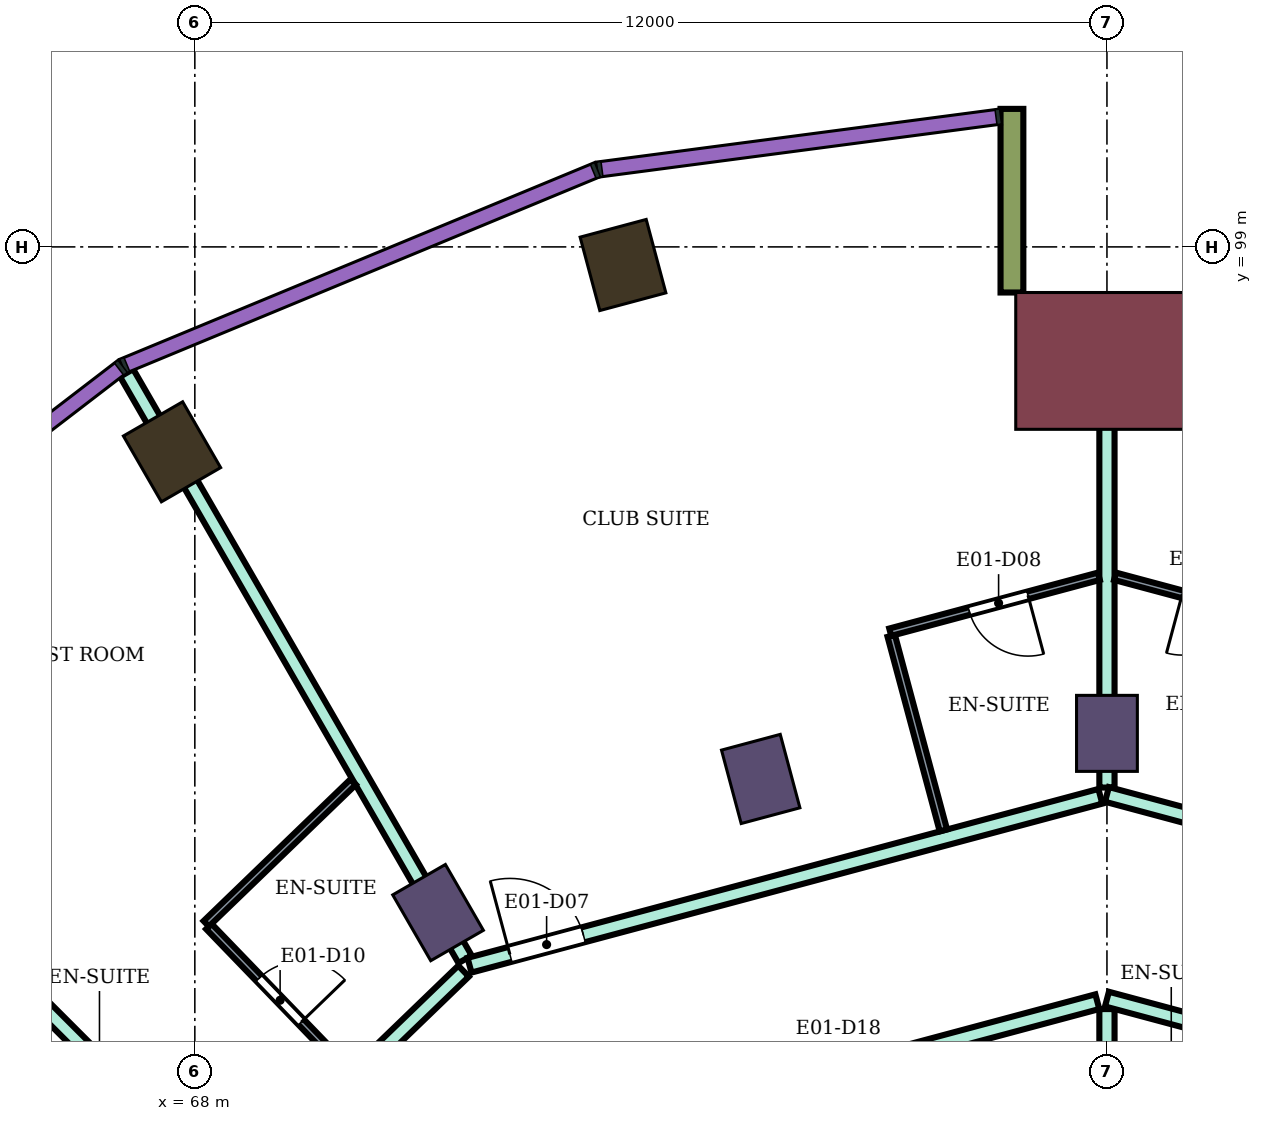
"""IFC4 building model, lengths in metres.
Left out: names, types, materials, properties, quantities, classifications, styles, units other than length and angle.
Written with IfcOpenShell. Run it as: python <this file> out.ifc"""

import sys

from ifc_helpers import new_model, si_unit, direction, frame, frame_2d, origin, origin_2d, place, context, subcontext, project, spatial, rectangle, extrude, element, fill, save


model = new_model("IFC4")
c1 = context("Model", 3, precision=1e-05, world=origin(), true_north=direction((0.0, 1.0)))
c2 = subcontext(c1, "Body", "Model", "MODEL_VIEW")
j1 = project(units=[si_unit("LENGTHUNIT", "METRE"), si_unit("PLANEANGLEUNIT", "RADIAN")], contexts=[c1])
p1 = place(None, origin())
s1 = spatial("IfcSite", under=j1, at=p1, CompositionType="ELEMENT")
p2 = place(p1, origin())
s2 = spatial("IfcBuilding", under=s1, at=p2, CompositionType="ELEMENT")
p3 = place(p2, frame((0.0, 0.0, 118.5)))
s3 = spatial("IfcBuildingStorey", under=s2, at=p3, CompositionType="ELEMENT", Elevation=118.5)
for number, where, z_axis, x_axis in (
    (1, (73.633, 98.762, 0.0), (0.0, 0.0, 1.0), (-0.259, 0.966, 0.0)),
    (2, (67.7, 96.304, 0.0), (0.0, 0.0, 1.0), (-0.5, 0.866, 0.0)),
):
    element("IfcColumn", number, at=place(p3, frame(where, z_axis=z_axis, x_axis=x_axis)), inside=s3, PredefinedType="COLUMN", context=c2, shape_type="SweptSolid", body=[
        extrude(rectangle(XDim=1.0, YDim=0.9, at=origin_2d()), origin(), (0.0, 0.0, 1.0), 3.9),
    ])
for number, where, z_axis, x_axis in (
    (3, (80.0, 92.6, 0.0), (0.0, 0.0, 1.0), (0.0, 1.0, 0.0)),
    (4, (75.445, 92.0, 0.0), (0.0, 0.0, 1.0), (-0.259, 0.966, 0.0)),
    (5, (71.2, 90.242, 0.0), (0.0, 0.0, 1.0), (-0.5, 0.866, 0.0)),
):
    element("IfcColumn", number, at=place(p3, frame(where, z_axis=z_axis, x_axis=x_axis)), inside=s3, PredefinedType="COLUMN", context=c2, shape_type="SweptSolid", body=[
        extrude(rectangle(XDim=1.0, YDim=0.8, at=origin_2d()), origin(), (0.0, 0.0, 1.0), 3.9),
    ])
p4 = place(p3, frame((80.0, 97.5, 0.0), z_axis=(0.0, 0.0, 1.0), x_axis=(0.0, 1.0, 0.0)))
e6 = element("IfcColumn", 6, at=p4, inside=s3, PredefinedType="COLUMN", context=c2, shape_type="SweptSolid", body=[
    extrude(rectangle(XDim=1.8, YDim=2.4, at=origin_2d()), origin(), (0.0, 0.0, 1.0), 3.9),
])
p5 = place(p3, frame((78.75, 98.4, 0.0), z_axis=(0.0, 0.0, 1.0), x_axis=(0.0, 1.0, 0.0)))
e7 = element("IfcWall", 7, at=p5, inside=s3, PredefinedType="NOTDEFINED", context=c2, shape_type="SweptSolid", body=[
    extrude(rectangle(XDim=2.416, YDim=0.3, at=frame_2d((1.208, 0.0))), origin(), (0.0, 0.0, 1.0), 3.9),
])
p6 = place(p3, frame((63.598, 91.408, 0.0), z_axis=(0.0, 0.0, 1.0), x_axis=(0.706963264491, -0.707250268759, 0.0)))
e8 = element("IfcWall", 8, at=p6, inside=s3, PredefinedType="PARTITIONING", context=c2, shape_type="SweptSolid", body=[
    extrude(rectangle(XDim=6.805, YDim=0.2, at=frame_2d((3.403, 0.0))), origin(), (0.0, 0.0, 1.0), 3.45),
])
p7 = place(p3, frame((66.797, 84.9, 0.0), z_axis=(0.0, 0.0, 1.0), x_axis=(0.719692092412, 0.694293376116, 0.0)))
e9 = element("IfcWall", 9, at=p7, inside=s3, PredefinedType="PARTITIONING", context=c2, shape_type="SweptSolid", body=[
    extrude(rectangle(XDim=6.584, YDim=0.2, at=frame_2d((3.292, 0.0))), origin(), (0.0, 0.0, 1.0), 3.45),
])
p8 = place(p7, frame((2.866, 0.0, 0.0)))
e10 = element("IfcOpeningElement", 10, at=p8, cuts=e9, PredefinedType="OPENING", context=c2, shape_type="SweptSolid", body=[
    extrude(rectangle(XDim=1.0, YDim=2.1, at=frame_2d((0.5, 1.05))), frame((0.0, 0.11, 0.0), z_axis=(0.0, -1.0, 0.0), x_axis=(1.0, 0.0, 0.0)), (0.0, 0.0, 1.0), 0.22),
])
p9 = place(p3, frame((67.102, 97.342, 0.0), z_axis=(0.0, 0.0, 1.0), x_axis=(0.499927298089, -0.866067374183, 0.0)))
e11 = element("IfcWall", 11, at=p9, inside=s3, PredefinedType="PARTITIONING", context=c2, shape_type="SweptSolid", body=[
    extrude(rectangle(XDim=8.907, YDim=0.2, at=frame_2d((4.454, 0.0))), origin(), (0.0, 0.0, 1.0), 3.45),
])
p10 = place(p3, frame((71.614, 89.55, 0.0), z_axis=(0.0, 0.0, 1.0), x_axis=(0.965967958589, 0.258661753994, 0.0)))
e12 = element("IfcWall", 12, at=p10, inside=s3, PredefinedType="PARTITIONING", context=c2, shape_type="SweptSolid", body=[
    extrude(rectangle(XDim=8.592, YDim=0.2, at=frame_2d((4.296, 0.0))), origin(), (0.0, 0.0, 1.0), 3.45),
])
p11 = place(p10, frame((0.55, 0.0, 0.0)))
e13 = element("IfcOpeningElement", 13, at=p11, cuts=e12, PredefinedType="OPENING", context=c2, shape_type="SweptSolid", body=[
    extrude(rectangle(XDim=1.0, YDim=2.1, at=frame_2d((0.5, 1.05))), frame((0.0, 0.11, 0.0), z_axis=(0.0, -1.0, 0.0), x_axis=(1.0, 0.0, 0.0)), (0.0, 0.0, 1.0), 0.22),
])
p12 = place(p3, frame((72.936, 87.211, 0.0), z_axis=(0.0, 0.0, 1.0), x_axis=(0.965917703859, 0.258849356521, 0.0)))
e14 = element("IfcWall", 14, at=p12, inside=s3, PredefinedType="PARTITIONING", context=c2, shape_type="SweptSolid", body=[
    extrude(rectangle(XDim=7.182, YDim=0.2, at=frame_2d((3.591, 0.0))), origin(), (0.0, 0.0, 1.0), 3.45),
])
p13 = place(p12, frame((2.757, 0.0, 0.0)))
e15 = element("IfcOpeningElement", 15, at=p13, cuts=e14, PredefinedType="OPENING", context=c2, shape_type="SweptSolid", body=[
    extrude(rectangle(XDim=1.8, YDim=2.1, at=frame_2d((0.9, 1.05))), frame((0.0, 0.11, 0.0), z_axis=(0.0, -1.0, 0.0), x_axis=(1.0, 0.0, 0.0)), (0.0, 0.0, 1.0), 0.22),
])
p14 = place(p3, frame((80.0, 82.7, 0.0), z_axis=(0.0, 0.0, 1.0), x_axis=(0.0, 1.0, 0.0)))
e16 = element("IfcWall", 16, at=p14, inside=s3, PredefinedType="PARTITIONING", context=c2, shape_type="SweptSolid", body=[
    extrude(rectangle(XDim=6.273, YDim=0.2, at=frame_2d((3.136, 0.0))), origin(), (0.0, 0.0, 1.0), 3.45),
])
p15 = place(p3, frame((80.0, 89.104, 0.0), z_axis=(0.0, 0.0, 1.0), x_axis=(0.965856548257, -0.259077455964, 0.0)))
e17 = element("IfcWall", 17, at=p15, inside=s3, PredefinedType="PARTITIONING", context=c2, shape_type="SweptSolid", body=[
    extrude(rectangle(XDim=7.173, YDim=0.2, at=frame_2d((3.586, 0.0))), origin(), (0.0, 0.0, 1.0), 3.45),
])
p16 = place(p15, frame((5.763, 0.0, 0.0)))
e18 = element("IfcOpeningElement", 18, at=p16, cuts=e17, PredefinedType="OPENING", context=c2, shape_type="SweptSolid", body=[
    extrude(rectangle(XDim=1.0, YDim=2.1, at=frame_2d((0.5, 1.05))), frame((0.0, 0.11, 0.0), z_axis=(0.0, -1.0, 0.0), x_axis=(1.0, 0.0, 0.0)), (0.0, 0.0, 1.0), 0.22),
])
p17 = place(p3, frame((80.0, 91.887, 0.0), z_axis=(0.0, 0.0, 1.0), x_axis=(0.0, 1.0, 0.0)))
e19 = element("IfcWall", 19, at=p17, inside=s3, PredefinedType="PARTITIONING", context=c2, shape_type="SweptSolid", body=[
    extrude(rectangle(XDim=6.312, YDim=0.2, at=frame_2d((3.156, 0.0))), origin(), (0.0, 0.0, 1.0), 3.45),
])
p18 = place(p3, frame((80.0, 91.797, 0.0), z_axis=(0.0, 0.0, 1.0), x_axis=(0.965857042792, -0.259075612301, 0.0)))
e20 = element("IfcWall", 20, at=p18, inside=s3, PredefinedType="PARTITIONING", context=c2, shape_type="SweptSolid", body=[
    extrude(rectangle(XDim=8.602, YDim=0.2, at=frame_2d((4.301, 0.0))), origin(), (0.0, 0.0, 1.0), 3.45),
])
p19 = place(p18, frame((4.877, 0.0, 0.0)))
e21 = element("IfcOpeningElement", 21, at=p19, cuts=e20, PredefinedType="OPENING", context=c2, shape_type="SweptSolid", body=[
    extrude(rectangle(XDim=1.0, YDim=2.1, at=frame_2d((0.5, 1.05))), frame((0.0, 0.11, 0.0), z_axis=(0.0, -1.0, 0.0), x_axis=(1.0, 0.0, 0.0)), (0.0, 0.0, 1.0), 0.22),
])
p20 = place(p18, frame((2.817, 0.0, 0.0)))
e22 = element("IfcOpeningElement", 22, at=p20, cuts=e20, PredefinedType="OPENING", context=c2, shape_type="SweptSolid", body=[
    extrude(rectangle(XDim=1.0, YDim=2.1, at=frame_2d((0.5, 1.05))), frame((0.0, 0.11, 0.0), z_axis=(0.0, -1.0, 0.0), x_axis=(1.0, 0.0, 0.0)), (0.0, 0.0, 1.0), 0.22),
])
p21 = place(p3, frame((68.185, 90.06, 0.0), z_axis=(0.0, 0.0, 1.0), x_axis=(0.69446127412, -0.719530081892, 0.0)))
e23 = element("IfcWall", 23, at=p21, inside=s3, PredefinedType="PARTITIONING", context=c2, shape_type="SweptSolid", body=[
    extrude(rectangle(XDim=2.649, YDim=0.1, at=frame_2d((1.324, 0.0))), origin(), (0.0, 0.0, 1.0), 3.45),
])
p22 = place(p21, frame((0.95, 0.0, 0.0)))
e24 = element("IfcOpeningElement", 24, at=p22, cuts=e23, PredefinedType="OPENING", context=c2, shape_type="SweptSolid", body=[
    extrude(rectangle(XDim=0.8, YDim=2.1, at=frame_2d((0.4, 1.05))), frame((0.0, 0.06, 0.0), z_axis=(0.0, -1.0, 0.0), x_axis=(1.0, 0.0, 0.0)), (0.0, 0.0, 1.0), 0.12),
])
p23 = place(p3, frame((68.15, 90.096, 0.0), z_axis=(0.0, 0.0, 1.0), x_axis=(0.719667544954, 0.694318820672, 0.0)))
e25 = element("IfcWall", 25, at=p23, inside=s3, PredefinedType="PARTITIONING", context=c2, shape_type="SweptSolid", body=[
    extrude(rectangle(XDim=2.687, YDim=0.1, at=frame_2d((1.344, 0.0))), origin(), (0.0, 0.0, 1.0), 3.45),
])
p24 = place(p3, frame((77.162, 93.883, 0.0), z_axis=(0.0, 0.0, 1.0), x_axis=(0.258998589493, -0.965877699629, 0.0)))
e26 = element("IfcWall", 26, at=p24, inside=s3, PredefinedType="PARTITIONING", context=c2, shape_type="SweptSolid", body=[
    extrude(rectangle(XDim=2.65, YDim=0.1, at=frame_2d((1.325, 0.0))), origin(), (0.0, 0.0, 1.0), 3.45),
])
p25 = place(p3, frame((77.149, 93.931, 0.0), z_axis=(0.0, 0.0, 1.0), x_axis=(0.965916219953, 0.258854893776, 0.0)))
e27 = element("IfcWall", 27, at=p25, inside=s3, PredefinedType="PARTITIONING", context=c2, shape_type="SweptSolid", body=[
    extrude(rectangle(XDim=2.842, YDim=0.1, at=frame_2d((1.421, 0.0))), origin(), (0.0, 0.0, 1.0), 3.45),
])
p26 = place(p25, frame((1.076, 0.0, 0.0)))
e28 = element("IfcOpeningElement", 28, at=p26, cuts=e27, PredefinedType="OPENING", context=c2, shape_type="SweptSolid", body=[
    extrude(rectangle(XDim=0.8, YDim=2.1, at=frame_2d((0.4, 1.05))), frame((0.0, 0.06, 0.0), z_axis=(0.0, -1.0, 0.0), x_axis=(1.0, 0.0, 0.0)), (0.0, 0.0, 1.0), 0.12),
])
p27 = place(p3, frame((80.106, 94.667, 0.0), z_axis=(0.0, 0.0, 1.0), x_axis=(0.965904298007, -0.258899376382, 0.0)))
e29 = element("IfcWall", 29, at=p27, inside=s3, PredefinedType="PARTITIONING", context=c2, shape_type="SweptSolid", body=[
    extrude(rectangle(XDim=2.69, YDim=0.1, at=frame_2d((1.345, 0.0))), origin(), (0.0, 0.0, 1.0), 3.45),
])
p28 = place(p27, frame((0.915, 0.0, 0.0)))
e30 = element("IfcOpeningElement", 30, at=p28, cuts=e29, PredefinedType="OPENING", context=c2, shape_type="SweptSolid", body=[
    extrude(rectangle(XDim=0.8, YDim=2.1, at=frame_2d((0.4, 1.05))), frame((0.0, 0.06, 0.0), z_axis=(0.0, -1.0, 0.0), x_axis=(1.0, 0.0, 0.0)), (0.0, 0.0, 1.0), 0.12),
])
p29 = place(p28, frame((0.8, 0.0, 0.0), z_axis=(0.0, 0.0, 1.0), x_axis=(-1.0, 0.0, 0.0)))
e31 = element("IfcDoor", 31, at=p29, inside=s3, OperationType="SINGLE_SWING_RIGHT", PredefinedType="DOOR", context=c2, shape_type="SweptSolid", body=[
    extrude(rectangle(XDim=0.8, YDim=2.1, at=frame_2d((0.4, 1.05))), frame((0.0, 0.025, 0.0), z_axis=(0.0, -1.0, 0.0), x_axis=(1.0, 0.0, 0.0)), (0.0, 0.0, 1.0), 0.05),
])
fill(e30, e31)
p30 = place(p11, origin())
e32 = element("IfcDoor", 32, at=p30, inside=s3, OperationType="SINGLE_SWING_LEFT", PredefinedType="DOOR", context=c2, shape_type="SweptSolid", body=[
    extrude(rectangle(XDim=1.0, YDim=2.1, at=frame_2d((0.5, 1.05))), frame((0.0, 0.025, 0.0), z_axis=(0.0, -1.0, 0.0), x_axis=(1.0, 0.0, 0.0)), (0.0, 0.0, 1.0), 0.05),
])
fill(e13, e32)
p31 = place(p26, frame((0.8, 0.0, 0.0), z_axis=(0.0, 0.0, 1.0), x_axis=(-1.0, 0.0, 0.0)))
e33 = element("IfcDoor", 33, at=p31, inside=s3, OperationType="SINGLE_SWING_LEFT", PredefinedType="DOOR", context=c2, shape_type="SweptSolid", body=[
    extrude(rectangle(XDim=0.8, YDim=2.1, at=frame_2d((0.4, 1.05))), frame((0.0, 0.025, 0.0), z_axis=(0.0, -1.0, 0.0), x_axis=(1.0, 0.0, 0.0)), (0.0, 0.0, 1.0), 0.05),
])
fill(e28, e33)
p32 = place(p22, origin())
e34 = element("IfcDoor", 34, at=p32, inside=s3, OperationType="SINGLE_SWING_RIGHT", PredefinedType="DOOR", context=c2, shape_type="SweptSolid", body=[
    extrude(rectangle(XDim=0.8, YDim=2.1, at=frame_2d((0.4, 1.05))), frame((0.0, 0.025, 0.0), z_axis=(0.0, -1.0, 0.0), x_axis=(1.0, 0.0, 0.0)), (0.0, 0.0, 1.0), 0.05),
])
fill(e24, e34)
save(model, sys.argv[1])
